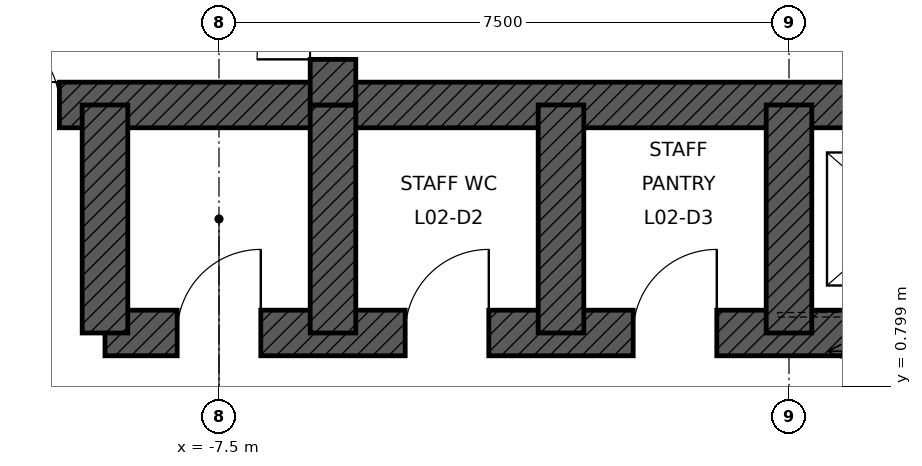
"""IFC4 building model, lengths in metres.
Left out: names, types, materials, properties, quantities, classifications, styles, units other than length and angle.
Written with IfcOpenShell. Run it as: python <this file> out.ifc"""

import sys

from ifc_helpers import new_model, si_unit, direction, frame, frame_2d, origin, place, context, subcontext, project, spatial, rectangle, extrude, element, fill, save


model = new_model("IFC4")
c1 = context("Model", 3, precision=1e-05, world=origin(), true_north=direction((0.0, 1.0)))
c2 = subcontext(c1, "Body", "Model", "MODEL_VIEW")
j1 = project(units=[si_unit("LENGTHUNIT", "METRE"), si_unit("PLANEANGLEUNIT", "RADIAN")], contexts=[c1])
p1 = place(None, origin())
s1 = spatial("IfcSite", under=j1, at=p1, CompositionType="ELEMENT")
p2 = place(p1, origin())
s2 = spatial("IfcBuilding", under=s1, at=p2, CompositionType="ELEMENT")
p3 = place(p2, frame((0.0, 0.0, 12.6)))
s3 = spatial("IfcBuildingStorey", under=s2, at=p3, CompositionType="ELEMENT", Elevation=12.6)
p4 = place(p3, frame((-11.0, 4.5, 0.0), z_axis=(0.0, 0.0, 1.0), x_axis=(1.0, 0.0, 0.0)))
e1 = element("IfcWall", 1, at=p4, inside=s3, PredefinedType="SHEAR", context=c2, shape_type="SweptSolid", body=[
    extrude(rectangle(XDim=22.0, YDim=0.6, at=frame_2d((11.0, 0.0))), origin(), (0.0, 0.0, 1.0), 5.4),
])
p5 = place(p4, frame((0.4, 0.0, 0.0)))
e2 = element("IfcOpeningElement", 2, at=p5, cuts=e1, PredefinedType="OPENING", context=c2, shape_type="SweptSolid", body=[
    extrude(rectangle(XDim=1.0, YDim=2.1, at=frame_2d((0.5, 1.05))), frame((0.0, 0.31, 0.0), z_axis=(0.0, -1.0, 0.0), x_axis=(1.0, 0.0, 0.0)), (0.0, 0.0, 1.0), 0.62),
])
p6 = place(p4, frame((20.6, 0.0, 0.0)))
e3 = element("IfcOpeningElement", 3, at=p6, cuts=e1, PredefinedType="OPENING", context=c2, shape_type="SweptSolid", body=[
    extrude(rectangle(XDim=1.0, YDim=2.1, at=frame_2d((0.5, 1.05))), frame((0.0, 0.31, 0.0), z_axis=(0.0, -1.0, 0.0), x_axis=(1.0, 0.0, 0.0)), (0.0, 0.0, 1.0), 0.62),
])
p7 = place(p3, frame((-9.0, 1.5, 0.0), z_axis=(0.0, 0.0, 1.0), x_axis=(1.0, 0.0, 0.0)))
e4 = element("IfcWall", 4, at=p7, inside=s3, PredefinedType="SHEAR", context=c2, shape_type="SweptSolid", body=[
    extrude(rectangle(XDim=18.0, YDim=0.6, at=frame_2d((9.0, 0.0))), origin(), (0.0, 0.0, 1.0), 5.4),
])
p8 = place(p7, frame((9.95, 0.0, 0.0)))
e5 = element("IfcOpeningElement", 5, at=p8, cuts=e4, PredefinedType="OPENING", context=c2, shape_type="SweptSolid", body=[
    extrude(rectangle(XDim=1.1, YDim=2.1, at=frame_2d((0.55, 1.05))), frame((0.0, 0.31, 0.0), z_axis=(0.0, -1.0, 0.0), x_axis=(1.0, 0.0, 0.0)), (0.0, 0.0, 1.0), 0.62),
])
p9 = place(p7, frame((12.95, 0.0, 0.0)))
e6 = element("IfcOpeningElement", 6, at=p9, cuts=e4, PredefinedType="OPENING", context=c2, shape_type="SweptSolid", body=[
    extrude(rectangle(XDim=1.1, YDim=2.1, at=frame_2d((0.55, 1.05))), frame((0.0, 0.31, 0.0), z_axis=(0.0, -1.0, 0.0), x_axis=(1.0, 0.0, 0.0)), (0.0, 0.0, 1.0), 0.62),
])
p10 = place(p7, frame((15.95, 0.0, 0.0)))
e7 = element("IfcOpeningElement", 7, at=p10, cuts=e4, PredefinedType="OPENING", context=c2, shape_type="SweptSolid", body=[
    extrude(rectangle(XDim=1.1, YDim=2.1, at=frame_2d((0.55, 1.05))), frame((0.0, 0.31, 0.0), z_axis=(0.0, -1.0, 0.0), x_axis=(1.0, 0.0, 0.0)), (0.0, 0.0, 1.0), 0.62),
])
p11 = place(p7, frame((0.95, 0.0, 0.0)))
e8 = element("IfcOpeningElement", 8, at=p11, cuts=e4, PredefinedType="OPENING", context=c2, shape_type="SweptSolid", body=[
    extrude(rectangle(XDim=1.1, YDim=2.1, at=frame_2d((0.55, 1.05))), frame((0.0, 0.31, 0.0), z_axis=(0.0, -1.0, 0.0), x_axis=(1.0, 0.0, 0.0)), (0.0, 0.0, 1.0), 0.62),
])
p12 = place(p7, frame((3.95, 0.0, 0.0)))
e9 = element("IfcOpeningElement", 9, at=p12, cuts=e4, PredefinedType="OPENING", context=c2, shape_type="SweptSolid", body=[
    extrude(rectangle(XDim=1.1, YDim=2.1, at=frame_2d((0.55, 1.05))), frame((0.0, 0.31, 0.0), z_axis=(0.0, -1.0, 0.0), x_axis=(1.0, 0.0, 0.0)), (0.0, 0.0, 1.0), 0.62),
])
p13 = place(p7, frame((6.95, 0.0, 0.0)))
e10 = element("IfcOpeningElement", 10, at=p13, cuts=e4, PredefinedType="OPENING", context=c2, shape_type="SweptSolid", body=[
    extrude(rectangle(XDim=1.1, YDim=2.1, at=frame_2d((0.55, 1.05))), frame((0.0, 0.31, 0.0), z_axis=(0.0, -1.0, 0.0), x_axis=(1.0, 0.0, 0.0)), (0.0, 0.0, 1.0), 0.62),
])
for number, where, z_axis, x_axis in (
    (11, (-9.0, 1.5, 0.0), (0.0, 0.0, 1.0), (0.0, 1.0, 0.0)),
    (12, (-6.0, 1.5, 0.0), (0.0, 0.0, 1.0), (0.0, 1.0, 0.0)),
    (13, (-3.0, 1.5, 0.0), (0.0, 0.0, 1.0), (0.0, 1.0, 0.0)),
    (14, (0.0, 1.5, 0.0), (0.0, 0.0, 1.0), (0.0, 1.0, 0.0)),
):
    element("IfcWall", number, at=place(p3, frame(where, z_axis=z_axis, x_axis=x_axis)), inside=s3, PredefinedType="SHEAR", context=c2, shape_type="SweptSolid", body=[
        extrude(rectangle(XDim=3.0, YDim=0.6, at=frame_2d((1.5, 0.0))), origin(), (0.0, 0.0, 1.0), 5.4),
    ])
p14 = place(p3, frame((-6.0, 4.5, 0.0), z_axis=(0.0, 0.0, 1.0), x_axis=(0.0, 1.0, 0.0)))
e15 = element("IfcWall", 15, at=p14, inside=s3, PredefinedType="SHEAR", context=c2, shape_type="SweptSolid", body=[
    extrude(rectangle(XDim=6.5, YDim=0.6, at=frame_2d((3.25, 0.0))), origin(), (0.0, 0.0, 1.0), 5.4),
])
p15 = place(p14, frame((0.6, 0.0, 0.0)))
e16 = element("IfcOpeningElement", 16, at=p15, cuts=e15, PredefinedType="OPENING", context=c2, shape_type="SweptSolid", body=[
    extrude(rectangle(XDim=1.0, YDim=2.1, at=frame_2d((0.5, 1.05))), frame((0.0, 0.31, 0.0), z_axis=(0.0, -1.0, 0.0), x_axis=(1.0, 0.0, 0.0)), (0.0, 0.0, 1.0), 0.62),
])
p16 = place(p5, origin())
e17 = element("IfcDoor", 17, at=p16, inside=s3, OperationType="SINGLE_SWING_LEFT", PredefinedType="DOOR", context=c2, shape_type="SweptSolid", body=[
    extrude(rectangle(XDim=1.0, YDim=2.1, at=frame_2d((0.5, 1.05))), frame((0.0, 0.025, 0.0), z_axis=(0.0, -1.0, 0.0), x_axis=(1.0, 0.0, 0.0)), (0.0, 0.0, 1.0), 0.05),
])
fill(e2, e17)
p17 = place(p15, origin())
e18 = element("IfcDoor", 18, at=p17, inside=s3, OperationType="SINGLE_SWING_LEFT", PredefinedType="DOOR", context=c2, shape_type="SweptSolid", body=[
    extrude(rectangle(XDim=1.0, YDim=2.1, at=frame_2d((0.5, 1.05))), frame((0.0, 0.025, 0.0), z_axis=(0.0, -1.0, 0.0), x_axis=(1.0, 0.0, 0.0)), (0.0, 0.0, 1.0), 0.05),
])
fill(e16, e18)
p18 = place(p11, origin())
e19 = element("IfcDoor", 19, at=p18, inside=s3, OperationType="SINGLE_SWING_RIGHT", PredefinedType="DOOR", context=c2, shape_type="SweptSolid", body=[
    extrude(rectangle(XDim=1.1, YDim=2.1, at=frame_2d((0.55, 1.05))), frame((0.0, 0.025, 0.0), z_axis=(0.0, -1.0, 0.0), x_axis=(1.0, 0.0, 0.0)), (0.0, 0.0, 1.0), 0.05),
])
fill(e8, e19)
p19 = place(p12, origin())
e20 = element("IfcDoor", 20, at=p19, inside=s3, OperationType="SINGLE_SWING_RIGHT", PredefinedType="DOOR", context=c2, shape_type="SweptSolid", body=[
    extrude(rectangle(XDim=1.1, YDim=2.1, at=frame_2d((0.55, 1.05))), frame((0.0, 0.025, 0.0), z_axis=(0.0, -1.0, 0.0), x_axis=(1.0, 0.0, 0.0)), (0.0, 0.0, 1.0), 0.05),
])
fill(e9, e20)
p20 = place(p13, origin())
e21 = element("IfcDoor", 21, at=p20, inside=s3, OperationType="SINGLE_SWING_RIGHT", PredefinedType="DOOR", context=c2, shape_type="SweptSolid", body=[
    extrude(rectangle(XDim=1.1, YDim=2.1, at=frame_2d((0.55, 1.05))), frame((0.0, 0.025, 0.0), z_axis=(0.0, -1.0, 0.0), x_axis=(1.0, 0.0, 0.0)), (0.0, 0.0, 1.0), 0.05),
])
fill(e10, e21)
save(model, sys.argv[1])
